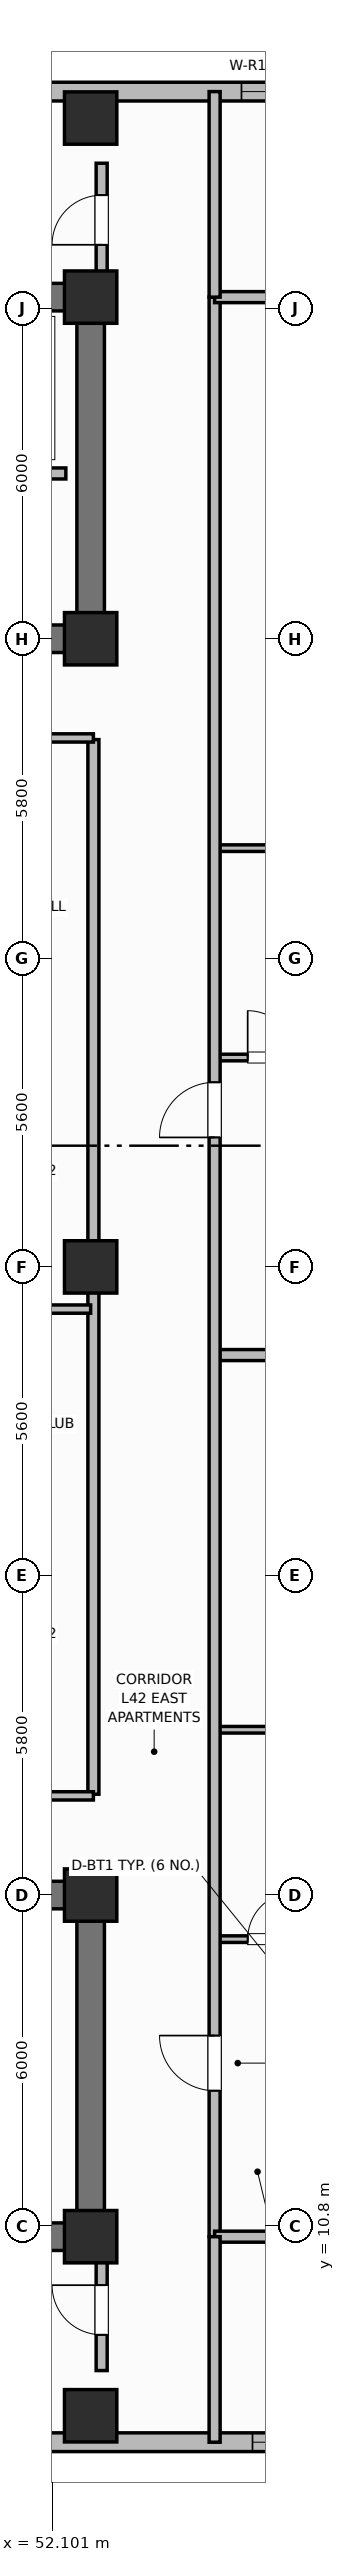
"""IFC4 building model, lengths in metres.
Left out: names, types, materials, properties, quantities, classifications, styles, units other than length and angle.
Written with IfcOpenShell. Run it as: python <this file> out.ifc"""

import sys

from ifc_helpers import new_model, si_unit, direction, frame, frame_2d, origin, origin_2d, place, context, subcontext, project, spatial, rectangle, extrude, element, fill, save


model = new_model("IFC4")
c1 = context("Model", 3, precision=1e-05, world=origin(), true_north=direction((0.0, 1.0)))
c2 = subcontext(c1, "Body", "Model", "MODEL_VIEW")
j1 = project(units=[si_unit("LENGTHUNIT", "METRE"), si_unit("PLANEANGLEUNIT", "RADIAN")], contexts=[c1])
p1 = place(None, origin())
s1 = spatial("IfcSite", under=j1, at=p1, CompositionType="ELEMENT")
p2 = place(p1, origin())
s2 = spatial("IfcBuilding", under=s1, at=p2, CompositionType="ELEMENT")
p3 = place(p2, frame((0.0, 0.0, 170.0)))
s3 = spatial("IfcBuildingStorey", under=s2, at=p3, CompositionType="ELEMENT", Elevation=170.0)
p4 = place(p3, frame((52.8, 10.6, 0.0), z_axis=(0.0, 0.0, 1.0), x_axis=(-1.0, 0.0, 0.0)))
e1 = element("IfcWall", 1, at=p4, inside=s3, PredefinedType="SHEAR", context=c2, shape_type="SweptSolid", body=[
    extrude(rectangle(XDim=27.2, YDim=0.5, at=frame_2d((13.6, 0.0))), origin(), (0.0, 0.0, 1.0), 3.7),
])
p5 = place(p3, frame((52.8, 10.85, 0.0), z_axis=(0.0, 0.0, 1.0), x_axis=(0.0, 1.0, 0.0)))
e2 = element("IfcWall", 2, at=p5, inside=s3, PredefinedType="SHEAR", context=c2, shape_type="SweptSolid", body=[
    extrude(rectangle(XDim=5.7, YDim=0.5, at=frame_2d((2.85, 0.0))), origin(), (0.0, 0.0, 1.0), 3.7),
])
p6 = place(p3, frame((25.6, 16.8, 0.0), z_axis=(0.0, 0.0, 1.0), x_axis=(1.0, 0.0, 0.0)))
e3 = element("IfcWall", 3, at=p6, inside=s3, PredefinedType="SHEAR", context=c2, shape_type="SweptSolid", body=[
    extrude(rectangle(XDim=27.2, YDim=0.5, at=frame_2d((13.6, 0.0))), origin(), (0.0, 0.0, 1.0), 3.7),
])
p7 = place(p6, frame((1.8, 0.0, 0.0)))
e4 = element("IfcOpeningElement", 4, at=p7, cuts=e3, PredefinedType="OPENING", context=c2, shape_type="SweptSolid", body=[
    extrude(rectangle(XDim=1.1, YDim=2.15, at=frame_2d((0.55, 1.075))), frame((0.0, 0.26, 0.0), z_axis=(0.0, -1.0, 0.0), x_axis=(1.0, 0.0, 0.0)), (0.0, 0.0, 1.0), 0.52),
])
p8 = place(p6, frame((5.6, 0.0, 0.0)))
e5 = element("IfcOpeningElement", 5, at=p8, cuts=e3, PredefinedType="OPENING", context=c2, shape_type="SweptSolid", body=[
    extrude(rectangle(XDim=0.85, YDim=2.1, at=frame_2d((0.425, 1.05))), frame((0.0, 0.26, 0.0), z_axis=(0.0, -1.0, 0.0), x_axis=(1.0, 0.0, 0.0)), (0.0, 0.0, 1.0), 0.52),
])
p9 = place(p6, frame((13.0, 0.0, 0.0)))
e6 = element("IfcOpeningElement", 6, at=p9, cuts=e3, PredefinedType="OPENING", context=c2, shape_type="SweptSolid", body=[
    extrude(rectangle(XDim=1.2, YDim=2.15, at=frame_2d((0.6, 1.075))), frame((0.0, 0.26, 0.0), z_axis=(0.0, -1.0, 0.0), x_axis=(1.0, 0.0, 0.0)), (0.0, 0.0, 1.0), 0.52),
])
p10 = place(p6, frame((19.2, 0.0, 0.0)))
e7 = element("IfcOpeningElement", 7, at=p10, cuts=e3, PredefinedType="OPENING", context=c2, shape_type="SweptSolid", body=[
    extrude(rectangle(XDim=0.85, YDim=2.1, at=frame_2d((0.425, 1.05))), frame((0.0, 0.26, 0.0), z_axis=(0.0, -1.0, 0.0), x_axis=(1.0, 0.0, 0.0)), (0.0, 0.0, 1.0), 0.52),
])
p11 = place(p6, frame((23.8, 0.0, 0.0)))
e8 = element("IfcOpeningElement", 8, at=p11, cuts=e3, PredefinedType="OPENING", context=c2, shape_type="SweptSolid", body=[
    extrude(rectangle(XDim=0.9, YDim=2.1, at=frame_2d((0.45, 1.05))), frame((0.0, 0.26, 0.0), z_axis=(0.0, -1.0, 0.0), x_axis=(1.0, 0.0, 0.0)), (0.0, 0.0, 1.0), 0.52),
])
p12 = place(p3, frame((25.6, 45.8, 0.0), z_axis=(0.0, 0.0, 1.0), x_axis=(1.0, 0.0, 0.0)))
e9 = element("IfcWall", 9, at=p12, inside=s3, PredefinedType="SHEAR", context=c2, shape_type="SweptSolid", body=[
    extrude(rectangle(XDim=27.2, YDim=0.5, at=frame_2d((13.6, 0.0))), origin(), (0.0, 0.0, 1.0), 3.7),
])
p13 = place(p3, frame((52.8, 39.85, 0.0), z_axis=(0.0, 0.0, 1.0), x_axis=(0.0, 1.0, 0.0)))
e10 = element("IfcWall", 10, at=p13, inside=s3, PredefinedType="SHEAR", context=c2, shape_type="SweptSolid", body=[
    extrude(rectangle(XDim=5.7, YDim=0.5, at=frame_2d((2.85, 0.0))), origin(), (0.0, 0.0, 1.0), 3.7),
])
p14 = place(p3, frame((52.8, 39.6, 0.0), z_axis=(0.0, 0.0, 1.0), x_axis=(-1.0, 0.0, 0.0)))
e11 = element("IfcWall", 11, at=p14, inside=s3, PredefinedType="SHEAR", context=c2, shape_type="SweptSolid", body=[
    extrude(rectangle(XDim=27.2, YDim=0.5, at=frame_2d((13.6, 0.0))), origin(), (0.0, 0.0, 1.0), 3.7),
])
p15 = place(p14, frame((24.2, 0.0, 0.0)))
e12 = element("IfcOpeningElement", 12, at=p15, cuts=e11, PredefinedType="OPENING", context=c2, shape_type="SweptSolid", body=[
    extrude(rectangle(XDim=1.1, YDim=2.15, at=frame_2d((0.55, 1.075))), frame((0.0, 0.26, 0.0), z_axis=(0.0, -1.0, 0.0), x_axis=(1.0, 0.0, 0.0)), (0.0, 0.0, 1.0), 0.52),
])
p16 = place(p14, frame((20.55, 0.0, 0.0)))
e13 = element("IfcOpeningElement", 13, at=p16, cuts=e11, PredefinedType="OPENING", context=c2, shape_type="SweptSolid", body=[
    extrude(rectangle(XDim=0.95, YDim=2.1, at=frame_2d((0.475, 1.05))), frame((0.0, 0.26, 0.0), z_axis=(0.0, -1.0, 0.0), x_axis=(1.0, 0.0, 0.0)), (0.0, 0.0, 1.0), 0.52),
])
p17 = place(p14, frame((15.1, 0.0, 0.0)))
e14 = element("IfcOpeningElement", 14, at=p17, cuts=e11, PredefinedType="OPENING", context=c2, shape_type="SweptSolid", body=[
    extrude(rectangle(XDim=1.2, YDim=2.15, at=frame_2d((0.6, 1.075))), frame((0.0, 0.26, 0.0), z_axis=(0.0, -1.0, 0.0), x_axis=(1.0, 0.0, 0.0)), (0.0, 0.0, 1.0), 0.52),
])
p18 = place(p14, frame((13.05, 0.0, 0.0)))
e15 = element("IfcOpeningElement", 15, at=p18, cuts=e11, PredefinedType="OPENING", context=c2, shape_type="SweptSolid", body=[
    extrude(rectangle(XDim=0.85, YDim=2.1, at=frame_2d((0.425, 1.05))), frame((0.0, 0.26, 0.0), z_axis=(0.0, -1.0, 0.0), x_axis=(1.0, 0.0, 0.0)), (0.0, 0.0, 1.0), 0.52),
])
p19 = place(p14, frame((11.0, 0.0, 0.0)))
e16 = element("IfcOpeningElement", 16, at=p19, cuts=e11, PredefinedType="OPENING", context=c2, shape_type="SweptSolid", body=[
    extrude(rectangle(XDim=0.85, YDim=2.1, at=frame_2d((0.425, 1.05))), frame((0.0, 0.26, 0.0), z_axis=(0.0, -1.0, 0.0), x_axis=(1.0, 0.0, 0.0)), (0.0, 0.0, 1.0), 0.52),
])
p20 = place(p14, frame((7.35, 0.0, 0.0)))
e17 = element("IfcOpeningElement", 17, at=p20, cuts=e11, PredefinedType="OPENING", context=c2, shape_type="SweptSolid", body=[
    extrude(rectangle(XDim=0.85, YDim=2.1, at=frame_2d((0.425, 1.05))), frame((0.0, 0.26, 0.0), z_axis=(0.0, -1.0, 0.0), x_axis=(1.0, 0.0, 0.0)), (0.0, 0.0, 1.0), 0.52),
])
p21 = place(p14, frame((4.8, 0.0, 0.0)))
e18 = element("IfcOpeningElement", 18, at=p21, cuts=e11, PredefinedType="OPENING", context=c2, shape_type="SweptSolid", body=[
    extrude(rectangle(XDim=0.85, YDim=2.1, at=frame_2d((0.425, 1.05))), frame((0.0, 0.26, 0.0), z_axis=(0.0, -1.0, 0.0), x_axis=(1.0, 0.0, 0.0)), (0.0, 0.0, 1.0), 0.52),
])
p22 = place(p14, frame((1.9, 0.0, 0.0)))
e19 = element("IfcOpeningElement", 19, at=p22, cuts=e11, PredefinedType="OPENING", context=c2, shape_type="SweptSolid", body=[
    extrude(rectangle(XDim=0.85, YDim=2.1, at=frame_2d((0.425, 1.05))), frame((0.0, 0.26, 0.0), z_axis=(0.0, -1.0, 0.0), x_axis=(1.0, 0.0, 0.0)), (0.0, 0.0, 1.0), 0.52),
])
for number, where, z_axis, x_axis in (
    (20, (52.8, 10.6, 0.0), (0.0, 0.0, 1.0), (1.0, 0.0, 0.0)),
    (21, (52.8, 16.8, 0.0), (0.0, 0.0, 1.0), (1.0, 0.0, 0.0)),
    (22, (52.8, 39.6, 0.0), (0.0, 0.0, 1.0), (1.0, 0.0, 0.0)),
    (23, (52.8, 45.8, 0.0), (0.0, 0.0, 1.0), (1.0, 0.0, 0.0)),
    (24, (52.8, 28.2, 0.0), (0.0, 0.0, 1.0), (1.0, 0.0, 0.0)),
    (25, (52.8, 7.35, 0.0), (0.0, 0.0, 1.0), (1.0, 0.0, 0.0)),
    (26, (52.8, 49.05, 0.0), (0.0, 0.0, 1.0), (1.0, 0.0, 0.0)),
):
    element("IfcColumn", number, at=place(p3, frame(where, z_axis=z_axis, x_axis=x_axis)), inside=s3, PredefinedType="COLUMN", context=c2, shape_type="SweptSolid", body=[
        extrude(rectangle(XDim=0.95, YDim=0.95, at=origin_2d()), origin(), (0.0, 0.0, 1.0), 3.7),
    ])
p23 = place(p3, frame((42.4, 6.87, 0.0), z_axis=(0.0, 0.0, 1.0), x_axis=(1.0, 0.0, 0.0)))
e27 = element("IfcWall", 27, at=p23, inside=s3, PredefinedType="SOLIDWALL", context=c2, shape_type="SweptSolid", body=[
    extrude(rectangle(XDim=15.8, YDim=0.34, at=frame_2d((7.9, 0.0))), origin(), (0.0, 0.0, 1.0), 2.72),
])
p24 = place(p23, frame((5.387, 0.0, 0.75)))
e28 = element("IfcOpeningElement", 28, at=p24, cuts=e27, PredefinedType="OPENING", context=c2, shape_type="SweptSolid", body=[
    extrude(rectangle(XDim=1.4, YDim=1.85, at=frame_2d((0.7, 0.925))), frame((0.0, 0.18, 0.0), z_axis=(0.0, -1.0, 0.0), x_axis=(1.0, 0.0, 0.0)), (0.0, 0.0, 1.0), 0.36),
])
p25 = place(p23, frame((13.337, 0.0, 0.75)))
e29 = element("IfcOpeningElement", 29, at=p25, cuts=e27, PredefinedType="OPENING", context=c2, shape_type="SweptSolid", body=[
    extrude(rectangle(XDim=1.4, YDim=1.85, at=frame_2d((0.7, 0.925))), frame((0.0, 0.18, 0.0), z_axis=(0.0, -1.0, 0.0), x_axis=(1.0, 0.0, 0.0)), (0.0, 0.0, 1.0), 0.36),
])
p26 = place(p3, frame((58.2, 49.53, 0.0), z_axis=(0.0, 0.0, 1.0), x_axis=(-1.0, 0.0, 0.0)))
e30 = element("IfcWall", 30, at=p26, inside=s3, PredefinedType="SOLIDWALL", context=c2, shape_type="SweptSolid", body=[
    extrude(rectangle(XDim=15.8, YDim=0.34, at=frame_2d((7.9, 0.0))), origin(), (0.0, 0.0, 1.0), 2.72),
])
p27 = place(p26, frame((0.863, 0.0, 0.75)))
e31 = element("IfcOpeningElement", 31, at=p27, cuts=e30, PredefinedType="OPENING", context=c2, shape_type="SweptSolid", body=[
    extrude(rectangle(XDim=1.8, YDim=1.85, at=frame_2d((0.9, 0.925))), frame((0.0, 0.18, 0.0), z_axis=(0.0, -1.0, 0.0), x_axis=(1.0, 0.0, 0.0)), (0.0, 0.0, 1.0), 0.36),
])
p28 = place(p26, frame((8.812, 0.0, 0.75)))
e32 = element("IfcOpeningElement", 32, at=p28, cuts=e30, PredefinedType="OPENING", context=c2, shape_type="SweptSolid", body=[
    extrude(rectangle(XDim=1.8, YDim=1.85, at=frame_2d((0.9, 0.925))), frame((0.0, 0.18, 0.0), z_axis=(0.0, -1.0, 0.0), x_axis=(1.0, 0.0, 0.0)), (0.0, 0.0, 1.0), 0.36),
])
p29 = place(p3, frame((52.35, 42.6, 0.0), z_axis=(0.0, 0.0, 1.0), x_axis=(-1.0, 0.0, 0.0)))
e33 = element("IfcWall", 33, at=p29, inside=s3, PredefinedType="PARTITIONING", context=c2, shape_type="SweptSolid", body=[
    extrude(rectangle(XDim=6.5, YDim=0.2, at=frame_2d((3.25, 0.0))), origin(), (0.0, 0.0, 1.0), 2.55),
])
p30 = place(p3, frame((52.85, 18.63, 0.0), z_axis=(0.0, 0.0, 1.0), x_axis=(0.0, 1.0, 0.0)))
e34 = element("IfcWall", 34, at=p30, inside=s3, PredefinedType="PARTITIONING", context=c2, shape_type="SweptSolid", body=[
    extrude(rectangle(XDim=19.14, YDim=0.2, at=frame_2d((9.57, 0.0))), origin(), (0.0, 0.0, 1.0), 2.55),
])
for number, where, z_axis, x_axis in (
    (35, (50.05, 18.6, 0.0), (0.0, 0.0, 1.0), (1.0, 0.0, 0.0)),
    (36, (50.05, 37.8, 0.0), (0.0, 0.0, 1.0), (1.0, 0.0, 0.0)),
):
    element("IfcWall", number, at=place(p3, frame(where, z_axis=z_axis, x_axis=x_axis)), inside=s3, PredefinedType="PARTITIONING", context=c2, shape_type="SweptSolid", body=[
        extrude(rectangle(XDim=2.8, YDim=0.15, at=frame_2d((1.4, 0.0))), origin(), (0.0, 0.0, 1.0), 2.55),
    ])
p31 = place(p3, frame((50.08, 27.434, 0.0), z_axis=(0.0, 0.0, 1.0), x_axis=(1.0, 0.0, 0.0)))
e37 = element("IfcWall", 37, at=p31, inside=s3, PredefinedType="PARTITIONING", context=c2, shape_type="SweptSolid", body=[
    extrude(rectangle(XDim=2.72, YDim=0.15, at=frame_2d((1.36, 0.0))), origin(), (0.0, 0.0, 1.0), 2.55),
])
p32 = place(p3, frame((55.05, 16.0, 0.0), z_axis=(0.0, 0.0, 1.0), x_axis=(1.0, 0.0, 0.0)))
e38 = element("IfcWall", 38, at=p32, inside=s3, PredefinedType="PARTITIONING", context=c2, shape_type="SweptSolid", body=[
    extrude(rectangle(XDim=2.25, YDim=0.12, at=frame_2d((1.125, 0.0))), origin(), (0.0, 0.0, 1.0), 2.55),
])
p33 = place(p32, frame((0.6, 0.0, 0.0)))
e39 = element("IfcOpeningElement", 39, at=p33, cuts=e38, PredefinedType="OPENING", context=c2, shape_type="SweptSolid", body=[
    extrude(rectangle(XDim=0.85, YDim=2.1, at=frame_2d((0.425, 1.05))), frame((0.0, 0.07, 0.0), z_axis=(0.0, -1.0, 0.0), x_axis=(1.0, 0.0, 0.0)), (0.0, 0.0, 1.0), 0.14),
])
p34 = place(p3, frame((55.05, 19.8, 0.0), z_axis=(0.0, 0.0, 1.0), x_axis=(1.0, 0.0, 0.0)))
e40 = element("IfcWall", 40, at=p34, inside=s3, PredefinedType="PARTITIONING", context=c2, shape_type="SweptSolid", body=[
    extrude(rectangle(XDim=2.25, YDim=0.12, at=frame_2d((1.125, 0.0))), origin(), (0.0, 0.0, 1.0), 2.55),
])
p35 = place(p3, frame((55.05, 26.6, 0.0), z_axis=(0.0, 0.0, 1.0), x_axis=(1.0, 0.0, 0.0)))
e41 = element("IfcWall", 41, at=p35, inside=s3, PredefinedType="PARTITIONING", context=c2, shape_type="SweptSolid", body=[
    extrude(rectangle(XDim=6.066, YDim=0.2, at=frame_2d((3.033, 0.0))), origin(), (0.0, 0.0, 1.0), 2.55),
])
p36 = place(p3, frame((55.05, 32.0, 0.0), z_axis=(0.0, 0.0, 1.0), x_axis=(1.0, 0.0, 0.0)))
e42 = element("IfcWall", 42, at=p36, inside=s3, PredefinedType="PARTITIONING", context=c2, shape_type="SweptSolid", body=[
    extrude(rectangle(XDim=2.25, YDim=0.12, at=frame_2d((1.125, 0.0))), origin(), (0.0, 0.0, 1.0), 2.55),
])
p37 = place(p36, frame((0.6, 0.0, 0.0)))
e43 = element("IfcOpeningElement", 43, at=p37, cuts=e42, PredefinedType="OPENING", context=c2, shape_type="SweptSolid", body=[
    extrude(rectangle(XDim=0.85, YDim=2.1, at=frame_2d((0.425, 1.05))), frame((0.0, 0.07, 0.0), z_axis=(0.0, -1.0, 0.0), x_axis=(1.0, 0.0, 0.0)), (0.0, 0.0, 1.0), 0.14),
])
p38 = place(p3, frame((55.05, 35.8, 0.0), z_axis=(0.0, 0.0, 1.0), x_axis=(1.0, 0.0, 0.0)))
e44 = element("IfcWall", 44, at=p38, inside=s3, PredefinedType="PARTITIONING", context=c2, shape_type="SweptSolid", body=[
    extrude(rectangle(XDim=2.25, YDim=0.12, at=frame_2d((1.125, 0.0))), origin(), (0.0, 0.0, 1.0), 2.55),
])
p39 = place(p3, frame((55.05, 10.6, 0.0), z_axis=(0.0, 0.0, 1.0), x_axis=(0.0, 1.0, 0.0)))
e45 = element("IfcWall", 45, at=p39, inside=s3, PredefinedType="PARTITIONING", context=c2, shape_type="SweptSolid", body=[
    extrude(rectangle(XDim=35.2, YDim=0.2, at=frame_2d((17.6, 0.0))), origin(), (0.0, 0.0, 1.0), 2.55),
])
p40 = place(p39, frame((2.65, 0.0, 0.0)))
e46 = element("IfcOpeningElement", 46, at=p40, cuts=e45, PredefinedType="OPENING", context=c2, shape_type="SweptSolid", body=[
    extrude(rectangle(XDim=1.0, YDim=2.15, at=frame_2d((0.5, 1.075))), frame((0.0, 0.11, 0.0), z_axis=(0.0, -1.0, 0.0), x_axis=(1.0, 0.0, 0.0)), (0.0, 0.0, 1.0), 0.22),
])
p41 = place(p39, frame((19.95, 0.0, 0.0)))
e47 = element("IfcOpeningElement", 47, at=p41, cuts=e45, PredefinedType="OPENING", context=c2, shape_type="SweptSolid", body=[
    extrude(rectangle(XDim=1.0, YDim=2.15, at=frame_2d((0.5, 1.075))), frame((0.0, 0.11, 0.0), z_axis=(0.0, -1.0, 0.0), x_axis=(1.0, 0.0, 0.0)), (0.0, 0.0, 1.0), 0.22),
])
for number, where, z_axis, x_axis in (
    (48, (55.05, 10.6, 0.0), (0.0, 0.0, 1.0), (1.0, 0.0, 0.0)),
    (49, (55.05, 45.8, 0.0), (0.0, 0.0, 1.0), (1.0, 0.0, 0.0)),
):
    element("IfcWall", number, at=place(p3, frame(where, z_axis=z_axis, x_axis=x_axis)), inside=s3, PredefinedType="PARTITIONING", context=c2, shape_type="SweptSolid", body=[
        extrude(rectangle(XDim=6.36, YDim=0.2, at=frame_2d((3.18, 0.0))), origin(), (0.0, 0.0, 1.0), 2.55),
    ])
for number, where, z_axis, x_axis in (
    (50, (55.05, 6.87, 0.0), (0.0, 0.0, 1.0), (0.0, 1.0, 0.0)),
    (51, (55.05, 45.8, 0.0), (0.0, 0.0, 1.0), (0.0, 1.0, 0.0)),
):
    element("IfcWall", number, at=place(p3, frame(where, z_axis=z_axis, x_axis=x_axis)), inside=s3, PredefinedType="PARTITIONING", context=c2, shape_type="SweptSolid", body=[
        extrude(rectangle(XDim=3.73, YDim=0.2, at=frame_2d((1.865, 0.0))), origin(), (0.0, 0.0, 1.0), 2.55),
    ])
p42 = place(p3, frame((53.0, 8.17, 0.0), z_axis=(0.0, 0.0, 1.0), x_axis=(0.0, 1.0, 0.0)))
e52 = element("IfcWall", 52, at=p42, inside=s3, PredefinedType="PARTITIONING", context=c2, shape_type="SweptSolid", body=[
    extrude(rectangle(XDim=2.13, YDim=0.2, at=frame_2d((1.065, 0.0))), origin(), (0.0, 0.0, 1.0), 2.55),
])
p43 = place(p42, frame((0.65, 0.0, 0.0)))
e53 = element("IfcOpeningElement", 53, at=p43, cuts=e52, PredefinedType="OPENING", context=c2, shape_type="SweptSolid", body=[
    extrude(rectangle(XDim=0.9, YDim=2.1, at=frame_2d((0.45, 1.05))), frame((0.0, 0.11, 0.0), z_axis=(0.0, -1.0, 0.0), x_axis=(1.0, 0.0, 0.0)), (0.0, 0.0, 1.0), 0.22),
])
p44 = place(p3, frame((53.0, 46.1, 0.0), z_axis=(0.0, 0.0, 1.0), x_axis=(0.0, 1.0, 0.0)))
e54 = element("IfcWall", 54, at=p44, inside=s3, PredefinedType="PARTITIONING", context=c2, shape_type="SweptSolid", body=[
    extrude(rectangle(XDim=2.13, YDim=0.2, at=frame_2d((1.065, 0.0))), origin(), (0.0, 0.0, 1.0), 2.55),
])
p45 = place(p44, frame((0.65, 0.0, 0.0)))
e55 = element("IfcOpeningElement", 55, at=p45, cuts=e54, PredefinedType="OPENING", context=c2, shape_type="SweptSolid", body=[
    extrude(rectangle(XDim=0.9, YDim=2.1, at=frame_2d((0.45, 1.05))), frame((0.0, 0.11, 0.0), z_axis=(0.0, -1.0, 0.0), x_axis=(1.0, 0.0, 0.0)), (0.0, 0.0, 1.0), 0.22),
])
p46 = place(p25, origin())
e56 = element("IfcWindow", 56, at=p46, inside=s3, PartitioningType="SINGLE_PANEL", PredefinedType="WINDOW", context=c2, shape_type="SweptSolid", body=[
    extrude(rectangle(XDim=1.4, YDim=1.85, at=frame_2d((0.7, 0.925))), frame((0.0, 0.03, 0.0), z_axis=(0.0, -1.0, 0.0), x_axis=(1.0, 0.0, 0.0)), (0.0, 0.0, 1.0), 0.06),
])
fill(e29, e56)
p47 = place(p27, origin())
e57 = element("IfcWindow", 57, at=p47, inside=s3, PartitioningType="SINGLE_PANEL", PredefinedType="WINDOW", context=c2, shape_type="SweptSolid", body=[
    extrude(rectangle(XDim=1.8, YDim=1.85, at=frame_2d((0.9, 0.925))), frame((0.0, 0.03, 0.0), z_axis=(0.0, -1.0, 0.0), x_axis=(1.0, 0.0, 0.0)), (0.0, 0.0, 1.0), 0.06),
])
fill(e31, e57)
p48 = place(p33, origin())
e58 = element("IfcDoor", 58, at=p48, inside=s3, OperationType="SINGLE_SWING_RIGHT", PredefinedType="DOOR", context=c2, shape_type="SweptSolid", body=[
    extrude(rectangle(XDim=0.85, YDim=2.1, at=frame_2d((0.425, 1.05))), frame((0.0, 0.025, 0.0), z_axis=(0.0, -1.0, 0.0), x_axis=(1.0, 0.0, 0.0)), (0.0, 0.0, 1.0), 0.05),
])
fill(e39, e58)
p49 = place(p37, origin())
e59 = element("IfcDoor", 59, at=p49, inside=s3, OperationType="SINGLE_SWING_LEFT", PredefinedType="DOOR", context=c2, shape_type="SweptSolid", body=[
    extrude(rectangle(XDim=0.85, YDim=2.1, at=frame_2d((0.425, 1.05))), frame((0.0, 0.025, 0.0), z_axis=(0.0, -1.0, 0.0), x_axis=(1.0, 0.0, 0.0)), (0.0, 0.0, 1.0), 0.05),
])
fill(e43, e59)
p50 = place(p40, origin())
e60 = element("IfcDoor", 60, at=p50, inside=s3, OperationType="SINGLE_SWING_RIGHT", PredefinedType="DOOR", context=c2, shape_type="SweptSolid", body=[
    extrude(rectangle(XDim=1.0, YDim=2.15, at=frame_2d((0.5, 1.075))), frame((0.0, 0.025, 0.0), z_axis=(0.0, -1.0, 0.0), x_axis=(1.0, 0.0, 0.0)), (0.0, 0.0, 1.0), 0.05),
])
fill(e46, e60)
p51 = place(p41, origin())
e61 = element("IfcDoor", 61, at=p51, inside=s3, OperationType="SINGLE_SWING_LEFT", PredefinedType="DOOR", context=c2, shape_type="SweptSolid", body=[
    extrude(rectangle(XDim=1.0, YDim=2.15, at=frame_2d((0.5, 1.075))), frame((0.0, 0.025, 0.0), z_axis=(0.0, -1.0, 0.0), x_axis=(1.0, 0.0, 0.0)), (0.0, 0.0, 1.0), 0.05),
])
fill(e47, e61)
p52 = place(p43, origin())
e62 = element("IfcDoor", 62, at=p52, inside=s3, OperationType="SINGLE_SWING_RIGHT", PredefinedType="DOOR", context=c2, shape_type="SweptSolid", body=[
    extrude(rectangle(XDim=0.9, YDim=2.1, at=frame_2d((0.45, 1.05))), frame((0.0, 0.025, 0.0), z_axis=(0.0, -1.0, 0.0), x_axis=(1.0, 0.0, 0.0)), (0.0, 0.0, 1.0), 0.05),
])
fill(e53, e62)
p53 = place(p45, origin())
e63 = element("IfcDoor", 63, at=p53, inside=s3, OperationType="SINGLE_SWING_LEFT", PredefinedType="DOOR", context=c2, shape_type="SweptSolid", body=[
    extrude(rectangle(XDim=0.9, YDim=2.1, at=frame_2d((0.45, 1.05))), frame((0.0, 0.025, 0.0), z_axis=(0.0, -1.0, 0.0), x_axis=(1.0, 0.0, 0.0)), (0.0, 0.0, 1.0), 0.05),
])
fill(e55, e63)
save(model, sys.argv[1])
